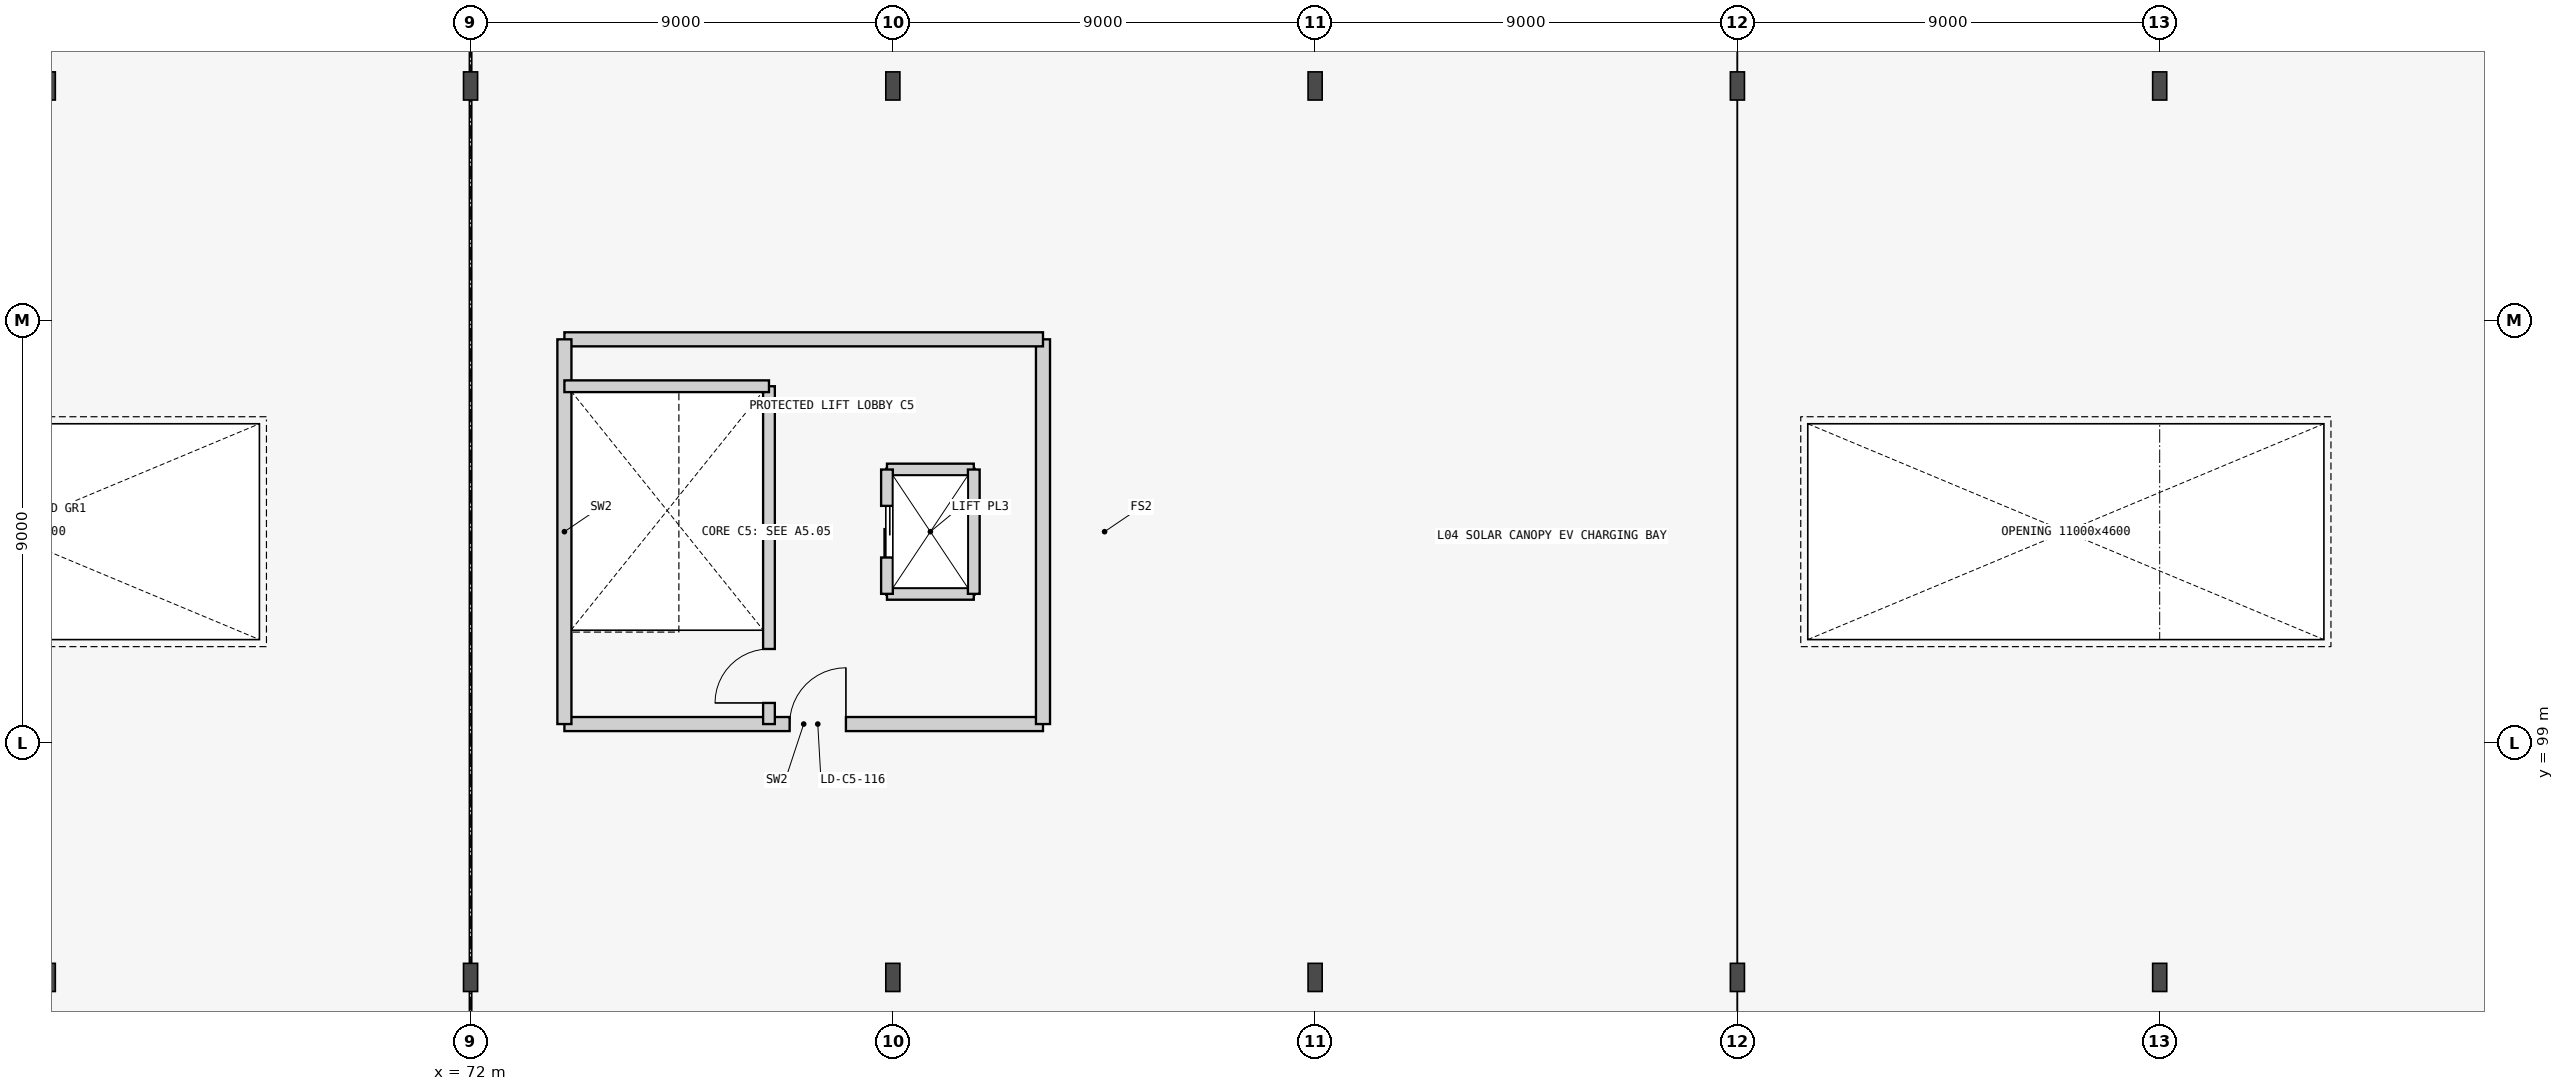
"""IFC4 building model, lengths in metres.
Left out: names, types, materials, properties, quantities, classifications, styles, units other than length and angle.
Written with IfcOpenShell. Run it as: python <this file> out.ifc"""

import sys

from ifc_helpers import new_model, si_unit, direction, frame, frame_2d, origin, origin_2d, place, context, subcontext, project, spatial, rectangle, i_section, extrude, element, fill, save


model = new_model("IFC4")
c1 = context("Model", 3, precision=1e-05, world=origin(), true_north=direction((0.0, 1.0)))
c2 = subcontext(c1, "Body", "Model", "MODEL_VIEW")
j1 = project(units=[si_unit("LENGTHUNIT", "METRE"), si_unit("PLANEANGLEUNIT", "RADIAN")], contexts=[c1])
p1 = place(None, origin())
s1 = spatial("IfcSite", under=j1, at=p1, CompositionType="ELEMENT")
p2 = place(p1, origin())
s2 = spatial("IfcBuilding", under=s1, at=p2, CompositionType="ELEMENT")
p3 = place(p2, frame((0.0, 0.0, 16.8)))
s3 = spatial("IfcBuildingStorey", under=s2, at=p3, CompositionType="ELEMENT", Elevation=16.8)
for number, where, z_axis, x_axis in (
    (1, (63.0, 94.0, 0.0), (0.0, 0.0, 1.0), (1.0, 0.0, 0.0)),
    (2, (63.0, 113.0, 0.0), (0.0, 0.0, 1.0), (1.0, 0.0, 0.0)),
    (3, (72.0, 94.0, 0.0), (0.0, 0.0, 1.0), (1.0, 0.0, 0.0)),
    (4, (72.0, 113.0, 0.0), (0.0, 0.0, 1.0), (1.0, 0.0, 0.0)),
    (5, (81.0, 94.0, 0.0), (0.0, 0.0, 1.0), (1.0, 0.0, 0.0)),
    (6, (81.0, 113.0, 0.0), (0.0, 0.0, 1.0), (1.0, 0.0, 0.0)),
    (7, (90.0, 94.0, 0.0), (0.0, 0.0, 1.0), (1.0, 0.0, 0.0)),
    (8, (90.0, 113.0, 0.0), (0.0, 0.0, 1.0), (1.0, 0.0, 0.0)),
    (9, (99.0, 94.0, 0.0), (0.0, 0.0, 1.0), (1.0, 0.0, 0.0)),
    (10, (99.0, 113.0, 0.0), (0.0, 0.0, 1.0), (1.0, 0.0, 0.0)),
    (11, (108.0, 94.0, 0.0), (0.0, 0.0, 1.0), (1.0, 0.0, 0.0)),
    (12, (108.0, 113.0, 0.0), (0.0, 0.0, 1.0), (1.0, 0.0, 0.0)),
):
    element("IfcColumn", number, at=place(p3, frame(where, z_axis=z_axis, x_axis=x_axis)), inside=s3, PredefinedType="COLUMN", context=c2, shape_type="SweptSolid", body=[
        extrude(i_section(OverallWidth=0.3, OverallDepth=0.6, WebThickness=0.015, FlangeThickness=0.03, FilletRadius=0.027, at=origin_2d()), origin(), (0.0, 0.0, 1.0), 4.2),
    ])
p4 = place(p3, frame((74.0, 99.4, 0.0), z_axis=(0.0, 0.0, 1.0), x_axis=(1.0, 0.0, 0.0)))
e13 = element("IfcWall", 13, at=p4, inside=s3, PredefinedType="SHEAR", context=c2, shape_type="SweptSolid", body=[
    extrude(rectangle(XDim=10.2, YDim=0.3, at=frame_2d((5.1, 0.0))), origin(), (0.0, 0.0, 1.0), 3.955),
])
p5 = place(p4, frame((4.8, 0.0, 0.0)))
e14 = element("IfcOpeningElement", 14, at=p5, cuts=e13, PredefinedType="OPENING", context=c2, shape_type="SweptSolid", body=[
    extrude(rectangle(XDim=1.2, YDim=2.15, at=frame_2d((0.6, 1.075))), frame((0.0, 0.16, 0.0), z_axis=(0.0, -1.0, 0.0), x_axis=(1.0, 0.0, 0.0)), (0.0, 0.0, 1.0), 0.32),
])
p6 = place(p3, frame((84.2, 99.4, 0.0), z_axis=(0.0, 0.0, 1.0), x_axis=(0.0, 1.0, 0.0)))
e15 = element("IfcWall", 15, at=p6, inside=s3, PredefinedType="SHEAR", context=c2, shape_type="SweptSolid", body=[
    extrude(rectangle(XDim=8.2, YDim=0.3, at=frame_2d((4.1, 0.0))), origin(), (0.0, 0.0, 1.0), 3.955),
])
p7 = place(p3, frame((84.2, 107.6, 0.0), z_axis=(0.0, 0.0, 1.0), x_axis=(-1.0, 0.0, 0.0)))
e16 = element("IfcWall", 16, at=p7, inside=s3, PredefinedType="SHEAR", context=c2, shape_type="SweptSolid", body=[
    extrude(rectangle(XDim=10.2, YDim=0.3, at=frame_2d((5.1, 0.0))), origin(), (0.0, 0.0, 1.0), 3.955),
])
p8 = place(p3, frame((74.0, 107.6, 0.0), z_axis=(0.0, 0.0, 1.0), x_axis=(0.0, -1.0, 0.0)))
e17 = element("IfcWall", 17, at=p8, inside=s3, PredefinedType="SHEAR", context=c2, shape_type="SweptSolid", body=[
    extrude(rectangle(XDim=8.2, YDim=0.3, at=frame_2d((4.1, 0.0))), origin(), (0.0, 0.0, 1.0), 3.955),
])
p9 = place(p3, frame((78.36, 99.4, 0.0), z_axis=(0.0, 0.0, 1.0), x_axis=(0.0, 1.0, 0.0)))
e18 = element("IfcWall", 18, at=p9, inside=s3, PredefinedType="SHEAR", context=c2, shape_type="SweptSolid", body=[
    extrude(rectangle(XDim=7.2, YDim=0.25, at=frame_2d((3.6, 0.0))), origin(), (0.0, 0.0, 1.0), 3.955),
])
p10 = place(p9, frame((0.45, 0.0, 0.0)))
e19 = element("IfcOpeningElement", 19, at=p10, cuts=e18, PredefinedType="OPENING", context=c2, shape_type="SweptSolid", body=[
    extrude(rectangle(XDim=1.15, YDim=2.15, at=frame_2d((0.575, 1.075))), frame((0.0, 0.135, 0.0), z_axis=(0.0, -1.0, 0.0), x_axis=(1.0, 0.0, 0.0)), (0.0, 0.0, 1.0), 0.27),
])
p11 = place(p3, frame((74.0, 106.6, 0.0), z_axis=(0.0, 0.0, 1.0), x_axis=(1.0, 0.0, 0.0)))
e20 = element("IfcWall", 20, at=p11, inside=s3, PredefinedType="SHEAR", context=c2, shape_type="SweptSolid", body=[
    extrude(rectangle(XDim=4.36, YDim=0.25, at=frame_2d((2.18, 0.0))), origin(), (0.0, 0.0, 1.0), 3.955),
])
for number, where, z_axis, x_axis in (
    (21, (80.875, 102.175, 0.0), (0.0, 0.0, 1.0), (1.0, 0.0, 0.0)),
    (22, (80.875, 104.825, 0.0), (0.0, 0.0, 1.0), (1.0, 0.0, 0.0)),
):
    element("IfcWall", number, at=place(p3, frame(where, z_axis=z_axis, x_axis=x_axis)), inside=s3, PredefinedType="SHEAR", context=c2, shape_type="SweptSolid", body=[
        extrude(rectangle(XDim=1.85, YDim=0.25, at=frame_2d((0.925, 0.0))), origin(), (0.0, 0.0, 1.0), 3.955),
    ])
p12 = place(p3, frame((82.725, 102.175, 0.0), z_axis=(0.0, 0.0, 1.0), x_axis=(0.0, 1.0, 0.0)))
e23 = element("IfcWall", 23, at=p12, inside=s3, PredefinedType="SHEAR", context=c2, shape_type="SweptSolid", body=[
    extrude(rectangle(XDim=2.65, YDim=0.25, at=frame_2d((1.325, 0.0))), origin(), (0.0, 0.0, 1.0), 3.955),
])
p13 = place(p3, frame((80.875, 102.175, 0.0), z_axis=(0.0, 0.0, 1.0), x_axis=(0.0, 1.0, 0.0)))
e24 = element("IfcWall", 24, at=p13, inside=s3, PredefinedType="SHEAR", context=c2, shape_type="SweptSolid", body=[
    extrude(rectangle(XDim=2.65, YDim=0.25, at=frame_2d((1.325, 0.0))), origin(), (0.0, 0.0, 1.0), 3.955),
])
p14 = place(p13, frame((0.775, 0.0, 0.0)))
e25 = element("IfcOpeningElement", 25, at=p14, cuts=e24, PredefinedType="OPENING", context=c2, shape_type="SweptSolid", body=[
    extrude(rectangle(XDim=1.1, YDim=2.15, at=frame_2d((0.55, 1.075))), frame((0.0, 0.135, 0.0), z_axis=(0.0, -1.0, 0.0), x_axis=(1.0, 0.0, 0.0)), (0.0, 0.0, 1.0), 0.27),
])
p15 = place(p10, origin())
e26 = element("IfcDoor", 26, at=p15, inside=s3, OperationType="SINGLE_SWING_LEFT", PredefinedType="DOOR", context=c2, shape_type="SweptSolid", body=[
    extrude(rectangle(XDim=1.15, YDim=2.15, at=frame_2d((0.575, 1.075))), frame((0.0, 0.025, 0.0), z_axis=(0.0, -1.0, 0.0), x_axis=(1.0, 0.0, 0.0)), (0.0, 0.0, 1.0), 0.05),
])
fill(e19, e26)
p16 = place(p5, origin())
e27 = element("IfcDoor", 27, at=p16, inside=s3, OperationType="SINGLE_SWING_RIGHT", PredefinedType="DOOR", context=c2, shape_type="SweptSolid", body=[
    extrude(rectangle(XDim=1.2, YDim=2.15, at=frame_2d((0.6, 1.075))), frame((0.0, 0.025, 0.0), z_axis=(0.0, -1.0, 0.0), x_axis=(1.0, 0.0, 0.0)), (0.0, 0.0, 1.0), 0.05),
])
fill(e14, e27)
p17 = place(p14, origin())
e28 = element("IfcDoor", 28, at=p17, inside=s3, OperationType="DOUBLE_DOOR_SLIDING", PredefinedType="USERDEFINED", context=c2, shape_type="SweptSolid", body=[
    extrude(rectangle(XDim=1.1, YDim=2.15, at=frame_2d((0.55, 1.075))), frame((0.0, 0.025, 0.0), z_axis=(0.0, -1.0, 0.0), x_axis=(1.0, 0.0, 0.0)), (0.0, 0.0, 1.0), 0.05),
])
fill(e25, e28)
save(model, sys.argv[1])
